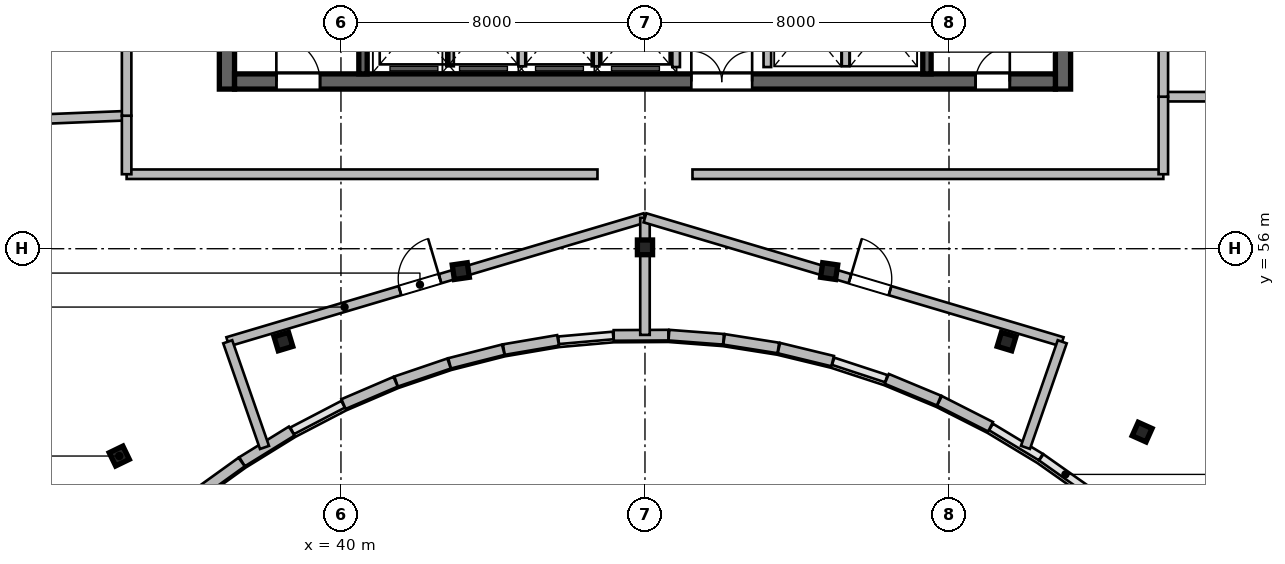
"""IFC4 building model, lengths in metres.
Left out: names, types, materials, properties, quantities, classifications, styles, units other than length and angle.
Written with IfcOpenShell. Run it as: python <this file> out.ifc"""

import sys

from ifc_helpers import new_model, si_unit, direction, frame, frame_2d, origin, origin_2d, place, context, subcontext, project, spatial, rectangle, i_section, extrude, source, transform, mapped, element, fill, save


model = new_model("IFC4")
c1 = context("Model", 3, precision=1e-05, world=origin(), true_north=direction((0.0, 1.0)))
c2 = subcontext(c1, "Body", "Model", "MODEL_VIEW")
j1 = project(units=[si_unit("LENGTHUNIT", "METRE"), si_unit("PLANEANGLEUNIT", "RADIAN")], contexts=[c1])
p1 = place(None, origin())
s1 = spatial("IfcSite", under=j1, at=p1, CompositionType="ELEMENT")
p2 = place(p1, origin())
s2 = spatial("IfcBuilding", under=s1, at=p2, CompositionType="ELEMENT")
p3 = place(p2, frame((0.0, 0.0, 295.2)))
s3 = spatial("IfcBuildingStorey", under=s2, at=p3, CompositionType="ELEMENT", Elevation=295.2)
m1 = source(origin(), c2, "Body", "SweptSolid", [
    extrude(rectangle(XDim=12.0, YDim=0.4, at=frame_2d((6.0, 0.0))), origin(), (0.0, 0.0, 1.0), 3.9),
])
for number, where, z_axis, x_axis in (
    (1, (37.0, 60.2, 0.0), (0.0, 0.0, 1.0), (0.0, 1.0, 0.0)),
    (2, (59.0, 60.2, 0.0), (0.0, 0.0, 1.0), (0.0, 1.0, 0.0)),
):
    element("IfcWall", number, at=place(p3, frame(where, z_axis=z_axis, x_axis=x_axis)), inside=s3, PredefinedType="SHEAR", context=c2, shape_type="MappedRepresentation", body=[
        mapped(m1, transform((0.0, 0.0, 0.0), scale=1.0)),
    ])
m2 = source(origin(), c2, "Body", "SweptSolid", [
    extrude(rectangle(XDim=21.6, YDim=0.4, at=frame_2d((10.8, 0.0))), origin(), (0.0, 0.0, 1.0), 3.9),
])
p4 = place(p3, frame((37.2, 60.4, 0.0), z_axis=(0.0, 0.0, 1.0), x_axis=(1.0, 0.0, 0.0)))
e3 = element("IfcWall", 3, at=p4, inside=s3, PredefinedType="SHEAR", context=c2, shape_type="MappedRepresentation", body=[
    mapped(m2, transform((0.0, 0.0, 0.0), scale=1.0)),
])
p5 = place(p4, frame((1.1, 0.0, 0.0)))
e4 = element("IfcOpeningElement", 4, at=p5, cuts=e3, PredefinedType="OPENING", context=c2, shape_type="SweptSolid", body=[
    extrude(rectangle(XDim=1.15, YDim=2.15, at=frame_2d((0.575, 1.075))), frame((0.0, 0.21, 0.0), z_axis=(0.0, -1.0, 0.0), x_axis=(1.0, 0.0, 0.0)), (0.0, 0.0, 1.0), 0.42),
])
p6 = place(p4, frame((19.5, 0.0, 0.0)))
e5 = element("IfcOpeningElement", 5, at=p6, cuts=e3, PredefinedType="OPENING", context=c2, shape_type="SweptSolid", body=[
    extrude(rectangle(XDim=0.9, YDim=2.1, at=frame_2d((0.45, 1.05))), frame((0.0, 0.21, 0.0), z_axis=(0.0, -1.0, 0.0), x_axis=(1.0, 0.0, 0.0)), (0.0, 0.0, 1.0), 0.42),
])
p7 = place(p4, frame((12.02, 0.0, 0.0)))
e6 = element("IfcOpeningElement", 6, at=p7, cuts=e3, PredefinedType="OPENING", context=c2, shape_type="SweptSolid", body=[
    extrude(rectangle(XDim=1.6, YDim=2.15, at=frame_2d((0.8, 1.075))), frame((0.0, 0.21, 0.0), z_axis=(0.0, -1.0, 0.0), x_axis=(1.0, 0.0, 0.0)), (0.0, 0.0, 1.0), 0.42),
])
m3 = source(origin(), c2, "Body", "SweptSolid", [
    extrude(rectangle(XDim=11.2, YDim=0.22, at=frame_2d((5.6, 0.0))), origin(), (0.0, 0.0, 1.0), 3.9),
])
p8 = place(p3, frame((40.58, 60.6, 0.0), z_axis=(0.0, 0.0, 1.0), x_axis=(0.0, 1.0, 0.0)))
e7 = element("IfcWall", 7, at=p8, inside=s3, PredefinedType="SHEAR", context=c2, shape_type="MappedRepresentation", body=[
    mapped(m3, transform((0.0, 0.0, 0.0), scale=1.0)),
])
p9 = place(p3, frame((55.42, 60.6, 0.0), z_axis=(0.0, 0.0, 1.0), x_axis=(0.0, 1.0, 0.0)))
e8 = element("IfcWall", 8, at=p9, inside=s3, PredefinedType="SHEAR", context=c2, shape_type="MappedRepresentation", body=[
    mapped(m3, transform((0.0, 0.0, 0.0), scale=1.0)),
])
p10 = place(p9, frame((9.645, 0.0, 0.0)))
e9 = element("IfcOpeningElement", 9, at=p10, cuts=e8, PredefinedType="OPENING", context=c2, shape_type="SweptSolid", body=[
    extrude(rectangle(XDim=1.15, YDim=2.15, at=frame_2d((0.575, 1.075))), frame((0.0, 0.12, 0.0), z_axis=(0.0, -1.0, 0.0), x_axis=(1.0, 0.0, 0.0)), (0.0, 0.0, 1.0), 0.24),
])
m4 = source(origin(), c2, "Body", "SweptSolid", [
    extrude(i_section(OverallWidth=0.399, OverallDepth=0.387, WebThickness=0.021, FlangeThickness=0.033, at=origin_2d()), origin(), (0.0, 0.0, 1.0), 3.9),
])
for number, where, z_axis, x_axis in (
    (10, (34.166, 50.545, 0.0), (0.0, 0.0, 1.0), (-0.436, 0.9, 0.0)),
    (11, (38.485, 53.558, 0.0), (0.0, 0.0, 1.0), (-0.289, 0.957, 0.0)),
    (12, (43.154, 55.411, 0.0), (0.0, 0.0, 1.0), (-0.143, 0.99, 0.0)),
    (13, (48.0, 56.036, 0.0), (0.0, 0.0, 1.0), (0.0, 1.0, 0.0)),
    (14, (52.846, 55.411, 0.0), (0.0, 0.0, 1.0), (0.143, 0.99, 0.0)),
    (15, (57.515, 53.558, 0.0), (0.0, 0.0, 1.0), (0.289, 0.957, 0.0)),
    (16, (61.082, 51.175, 0.0), (0.0, 0.0, 1.0), (0.409, 0.912, 0.0)),
):
    element("IfcColumn", number, at=place(p3, frame(where, z_axis=z_axis, x_axis=x_axis)), inside=s3, PredefinedType="COLUMN", context=c2, shape_type="MappedRepresentation", body=[
        mapped(m4, transform((0.0, 0.0, 0.0), scale=1.0)),
    ])
m5 = source(origin(), c2, "Body", "SweptSolid", [
    extrude(rectangle(XDim=1.509, YDim=0.28, at=frame_2d((0.754, 0.0))), origin(), (0.0, 0.0, 1.0), 3.64),
])
p11 = place(p3, frame((57.094, 51.315, 0.0), z_axis=(0.0, 0.0, 1.0), x_axis=(-0.89169189228, 0.452642871635, 0.0)))
e17 = element("IfcWall", 17, at=p11, inside=s3, PredefinedType="SOLIDWALL", context=c2, shape_type="MappedRepresentation", body=[
    mapped(m5, transform((0.0, 0.0, 0.0), scale=1.0)),
])
m6 = source(origin(), c2, "Body", "SweptSolid", [
    extrude(rectangle(XDim=1.488, YDim=0.28, at=frame_2d((0.744, 0.0))), origin(), (0.0, 0.0, 1.0), 3.64),
])
p12 = place(p3, frame((55.736, 52.004, 0.0), z_axis=(0.0, 0.0, 1.0), x_axis=(-0.923261314935, 0.384172545017, 0.0)))
e18 = element("IfcWall", 18, at=p12, inside=s3, PredefinedType="SOLIDWALL", context=c2, shape_type="MappedRepresentation", body=[
    mapped(m6, transform((0.0, 0.0, 0.0), scale=1.0)),
])
m7 = source(origin(), c2, "Body", "SweptSolid", [
    extrude(rectangle(XDim=1.457, YDim=0.28, at=frame_2d((0.728, 0.0))), origin(), (0.0, 0.0, 1.0), 3.64),
])
p13 = place(p3, frame((52.939, 53.042, 0.0), z_axis=(0.0, 0.0, 1.0), x_axis=(-0.97187219902, 0.23550887196, 0.0)))
e19 = element("IfcWall", 19, at=p13, inside=s3, PredefinedType="SOLIDWALL", context=c2, shape_type="MappedRepresentation", body=[
    mapped(m7, transform((0.0, 0.0, 0.0), scale=1.0)),
])
m8 = source(origin(), c2, "Body", "SweptSolid", [
    extrude(rectangle(XDim=1.446, YDim=0.28, at=frame_2d((0.723, 0.0))), origin(), (0.0, 0.0, 1.0), 3.64),
])
p14 = place(p3, frame((51.509, 53.388, 0.0), z_axis=(0.0, 0.0, 1.0), x_axis=(-0.987650460941, 0.156673440642, 0.0)))
e20 = element("IfcWall", 20, at=p14, inside=s3, PredefinedType="SOLIDWALL", context=c2, shape_type="MappedRepresentation", body=[
    mapped(m8, transform((0.0, 0.0, 0.0), scale=1.0)),
])
m9 = source(origin(), c2, "Body", "SweptSolid", [
    extrude(rectangle(XDim=1.44, YDim=0.28, at=frame_2d((0.72, 0.0))), origin(), (0.0, 0.0, 1.0), 3.64),
])
p15 = place(p3, frame((50.066, 53.616, 0.0), z_axis=(0.0, 0.0, 1.0), x_axis=(-0.997124860794, 0.075776064736, 0.0)))
e21 = element("IfcWall", 21, at=p15, inside=s3, PredefinedType="SOLIDWALL", context=c2, shape_type="MappedRepresentation", body=[
    mapped(m9, transform((0.0, 0.0, 0.0), scale=1.0)),
])
m10 = source(origin(), c2, "Body", "SweptSolid", [
    extrude(rectangle(XDim=1.438, YDim=0.28, at=frame_2d((0.719, 0.0))), origin(), (0.0, 0.0, 1.0), 3.64),
])
p16 = place(p3, frame((48.615, 53.726, 0.0), z_axis=(0.0, 0.0, 1.0), x_axis=(-0.999982357135, -0.005940153174, 0.0)))
e22 = element("IfcWall", 22, at=p16, inside=s3, PredefinedType="SOLIDWALL", context=c2, shape_type="MappedRepresentation", body=[
    mapped(m10, transform((0.0, 0.0, 0.0), scale=1.0)),
])
m11 = source(origin(), c2, "Body", "SweptSolid", [
    extrude(rectangle(XDim=1.447, YDim=0.28, at=frame_2d((0.724, 0.0))), origin(), (0.0, 0.0, 1.0), 3.64),
])
p17 = place(p3, frame((45.713, 53.589, 0.0), z_axis=(0.0, 0.0, 1.0), x_axis=(-0.985785525921, -0.168008621461, 0.0)))
e23 = element("IfcWall", 23, at=p17, inside=s3, PredefinedType="SOLIDWALL", context=c2, shape_type="MappedRepresentation", body=[
    mapped(m11, transform((0.0, 0.0, 0.0), scale=1.0)),
])
m12 = source(origin(), c2, "Body", "SweptSolid", [
    extrude(rectangle(XDim=1.458, YDim=0.28, at=frame_2d((0.729, 0.0))), origin(), (0.0, 0.0, 1.0), 3.64),
])
p18 = place(p3, frame((44.271, 53.343, 0.0), z_axis=(0.0, 0.0, 1.0), x_axis=(-0.969109544438, -0.246630677083, 0.0)))
e24 = element("IfcWall", 24, at=p18, inside=s3, PredefinedType="SOLIDWALL", context=c2, shape_type="MappedRepresentation", body=[
    mapped(m12, transform((0.0, 0.0, 0.0), scale=1.0)),
])
m13 = source(origin(), c2, "Body", "SweptSolid", [
    extrude(rectangle(XDim=1.473, YDim=0.28, at=frame_2d((0.736, 0.0))), origin(), (0.0, 0.0, 1.0), 3.64),
])
p19 = place(p3, frame((42.845, 52.979, 0.0), z_axis=(0.0, 0.0, 1.0), x_axis=(-0.946641296917, -0.322289086026, 0.0)))
e25 = element("IfcWall", 25, at=p19, inside=s3, PredefinedType="SOLIDWALL", context=c2, shape_type="MappedRepresentation", body=[
    mapped(m13, transform((0.0, 0.0, 0.0), scale=1.0)),
])
m14 = source(origin(), c2, "Body", "SweptSolid", [
    extrude(rectangle(XDim=1.49, YDim=0.28, at=frame_2d((0.745, 0.0))), origin(), (0.0, 0.0, 1.0), 3.64),
])
p20 = place(p3, frame((41.438, 52.5, 0.0), z_axis=(0.0, 0.0, 1.0), x_axis=(-0.919009427656, -0.394235553799, 0.0)))
e26 = element("IfcWall", 26, at=p20, inside=s3, PredefinedType="SOLIDWALL", context=c2, shape_type="MappedRepresentation", body=[
    mapped(m14, transform((0.0, 0.0, 0.0), scale=1.0)),
])
m15 = source(origin(), c2, "Body", "SweptSolid", [
    extrude(rectangle(XDim=1.535, YDim=0.28, at=frame_2d((0.768, 0.0))), origin(), (0.0, 0.0, 1.0), 3.64),
])
p21 = place(p3, frame((38.704, 51.201, 0.0), z_axis=(0.0, 0.0, 1.0), x_axis=(-0.850756173541, -0.525560589449, 0.0)))
e27 = element("IfcWall", 27, at=p21, inside=s3, PredefinedType="SOLIDWALL", context=c2, shape_type="MappedRepresentation", body=[
    mapped(m15, transform((0.0, 0.0, 0.0), scale=1.0)),
])
m16 = source(origin(), c2, "Body", "SweptSolid", [
    extrude(rectangle(XDim=1.561, YDim=0.28, at=frame_2d((0.781, 0.0))), origin(), (0.0, 0.0, 1.0), 3.64),
])
p22 = place(p3, frame((37.387, 50.387, 0.0), z_axis=(0.0, 0.0, 1.0), x_axis=(-0.81154027425, -0.584296485758, 0.0)))
e28 = element("IfcWall", 28, at=p22, inside=s3, PredefinedType="SOLIDWALL", context=c2, shape_type="MappedRepresentation", body=[
    mapped(m16, transform((0.0, 0.0, 0.0), scale=1.0)),
])
m17 = source(origin(), c2, "Body", "SweptSolid", [
    extrude(rectangle(XDim=2.24, YDim=0.2, at=frame_2d((1.12, 0.0))), origin(), (0.0, 0.0, 1.0), 3.64),
])
for number, where, z_axis, x_axis in (
    (29, (48.82, 60.78, 0.0), (0.0, 0.0, 1.0), (0.0, 1.0, 0.0)),
    (30, (51.22, 60.78, 0.0), (0.0, 0.0, 1.0), (0.0, 1.0, 0.0)),
):
    element("IfcWall", number, at=place(p3, frame(where, z_axis=z_axis, x_axis=x_axis)), inside=s3, PredefinedType="SOLIDWALL", context=c2, shape_type="MappedRepresentation", body=[
        mapped(m17, transform((0.0, 0.0, 0.0), scale=1.0)),
    ])
m18 = source(origin(), c2, "Body", "SweptSolid", [
    extrude(rectangle(XDim=2.2, YDim=0.2, at=frame_2d((1.1, 0.0))), origin(), (0.0, 0.0, 1.0), 3.64),
])
for number, where, z_axis, x_axis in (
    (31, (42.87, 60.8, 0.0), (0.0, 0.0, 1.0), (0.0, 1.0, 0.0)),
    (32, (44.77, 60.8, 0.0), (0.0, 0.0, 1.0), (0.0, 1.0, 0.0)),
    (33, (46.7, 60.8, 0.0), (0.0, 0.0, 1.0), (0.0, 1.0, 0.0)),
    (34, (53.28, 60.8, 0.0), (0.0, 0.0, 1.0), (0.0, 1.0, 0.0)),
):
    element("IfcWall", number, at=place(p3, frame(where, z_axis=z_axis, x_axis=x_axis)), inside=s3, PredefinedType="SOLIDWALL", context=c2, shape_type="MappedRepresentation", body=[
        mapped(m18, transform((0.0, 0.0, 0.0), scale=1.0)),
    ])
m19 = source(origin(), c2, "Body", "SweptSolid", [
    extrude(rectangle(XDim=11.454, YDim=0.25, at=frame_2d((5.727, 0.0))), origin(), (0.0, 0.0, 1.0), 3.314),
])
p23 = place(p3, frame((37.021, 53.552, 0.0), z_axis=(0.0, 0.0, 1.0), x_axis=(0.958594874645, 0.284773359541, 0.0)))
e35 = element("IfcWall", 35, at=p23, inside=s3, PredefinedType="PARTITIONING", context=c2, shape_type="MappedRepresentation", body=[
    mapped(m19, transform((0.0, 0.0, 0.0), scale=1.0)),
])
p24 = place(p23, frame((4.727, 0.0, 0.0)))
e36 = element("IfcOpeningElement", 36, at=p24, cuts=e35, PredefinedType="OPENING", context=c2, shape_type="SweptSolid", body=[
    extrude(rectangle(XDim=1.1, YDim=2.15, at=frame_2d((0.55, 1.075))), frame((0.0, 0.135, 0.0), z_axis=(0.0, -1.0, 0.0), x_axis=(1.0, 0.0, 0.0)), (0.0, 0.0, 1.0), 0.27),
])
m20 = source(origin(), c2, "Body", "SweptSolid", [
    extrude(rectangle(XDim=2.944, YDim=0.25, at=frame_2d((1.472, 0.0))), origin(), (0.0, 0.0, 1.0), 3.64),
])
p25 = place(p3, frame((37.988, 50.771, 0.0), z_axis=(0.0, 0.0, 1.0), x_axis=(-0.328565655286, 0.944481132774, 0.0)))
e37 = element("IfcWall", 37, at=p25, inside=s3, PredefinedType="PARTITIONING", context=c2, shape_type="MappedRepresentation", body=[
    mapped(m20, transform((0.0, 0.0, 0.0), scale=1.0)),
])
m21 = source(origin(), c2, "Body", "SweptSolid", [
    extrude(rectangle(XDim=3.081, YDim=0.25, at=frame_2d((1.54, 0.0))), origin(), (0.0, 0.0, 1.0), 3.314),
])
p26 = place(p3, frame((48.0, 53.733, 0.0), z_axis=(0.0, 0.0, 1.0), x_axis=(0.0, 1.0, 0.0)))
e38 = element("IfcWall", 38, at=p26, inside=s3, PredefinedType="PARTITIONING", context=c2, shape_type="MappedRepresentation", body=[
    mapped(m21, transform((0.0, 0.0, 0.0), scale=1.0)),
])
p27 = place(p3, frame((48.0, 56.813, 0.0), z_axis=(0.0, 0.0, 1.0), x_axis=(0.958594874645, -0.284773359541, 0.0)))
e39 = element("IfcWall", 39, at=p27, inside=s3, PredefinedType="PARTITIONING", context=c2, shape_type="MappedRepresentation", body=[
    mapped(m19, transform((0.0, 0.0, 0.0), scale=1.0)),
])
p28 = place(p27, frame((5.627, 0.0, 0.0)))
e40 = element("IfcOpeningElement", 40, at=p28, cuts=e39, PredefinedType="OPENING", context=c2, shape_type="SweptSolid", body=[
    extrude(rectangle(XDim=1.1, YDim=2.15, at=frame_2d((0.55, 1.075))), frame((0.0, 0.135, 0.0), z_axis=(0.0, -1.0, 0.0), x_axis=(1.0, 0.0, 0.0)), (0.0, 0.0, 1.0), 0.27),
])
m22 = source(origin(), c2, "Body", "SweptSolid", [
    extrude(rectangle(XDim=2.942, YDim=0.25, at=frame_2d((1.471, 0.0))), origin(), (0.0, 0.0, 1.0), 3.64),
])
p29 = place(p3, frame((58.013, 50.773, 0.0), z_axis=(0.0, 0.0, 1.0), x_axis=(0.328623620494, 0.944460965871, 0.0)))
e41 = element("IfcWall", 41, at=p29, inside=s3, PredefinedType="PARTITIONING", context=c2, shape_type="MappedRepresentation", body=[
    mapped(m22, transform((0.0, 0.0, 0.0), scale=1.0)),
])
m23 = source(origin(), c2, "Body", "SweptSolid", [
    extrude(rectangle(XDim=12.39, YDim=0.25, at=frame_2d((6.195, 0.0))), origin(), (0.0, 0.0, 1.0), 3.64),
])
for number, where, z_axis, x_axis in (
    (42, (34.36, 57.96, 0.0), (0.0, 0.0, 1.0), (1.0, 0.0, 0.0)),
    (43, (49.25, 57.96, 0.0), (0.0, 0.0, 1.0), (1.0, 0.0, 0.0)),
):
    element("IfcWall", number, at=place(p3, frame(where, z_axis=z_axis, x_axis=x_axis)), inside=s3, PredefinedType="PARTITIONING", context=c2, shape_type="MappedRepresentation", body=[
        mapped(m23, transform((0.0, 0.0, 0.0), scale=1.0)),
    ])
m24 = source(origin(), c2, "Body", "SweptSolid", [
    extrude(rectangle(XDim=13.499, YDim=0.25, at=frame_2d((6.75, 0.0))), origin(), (0.0, 0.0, 1.0), 3.64),
])
p30 = place(p3, frame((20.872, 58.951, 0.0), z_axis=(0.0, 0.0, 1.0), x_axis=(0.999172424054, 0.04067513995, 0.0)))
e44 = element("IfcWall", 44, at=p30, inside=s3, PredefinedType="PARTITIONING", context=c2, shape_type="MappedRepresentation", body=[
    mapped(m24, transform((0.0, 0.0, 0.0), scale=1.0)),
])
m25 = source(origin(), c2, "Body", "SweptSolid", [
    extrude(rectangle(XDim=1.54, YDim=0.25, at=frame_2d((0.77, 0.0))), origin(), (0.0, 0.0, 1.0), 3.64),
])
p31 = place(p3, frame((34.36, 57.96, 0.0), z_axis=(0.0, 0.0, 1.0), x_axis=(0.0, 1.0, 0.0)))
e45 = element("IfcWall", 45, at=p31, inside=s3, PredefinedType="PARTITIONING", context=c2, shape_type="MappedRepresentation", body=[
    mapped(m25, transform((0.0, 0.0, 0.0), scale=1.0)),
])
m26 = source(origin(), c2, "Body", "SweptSolid", [
    extrude(rectangle(XDim=6.0, YDim=0.25, at=frame_2d((3.0, 0.0))), origin(), (0.0, 0.0, 1.0), 3.64),
])
p32 = place(p3, frame((34.36, 59.5, 0.0), z_axis=(0.0, 0.0, 1.0), x_axis=(0.0, 1.0, 0.0)))
e46 = element("IfcWall", 46, at=p32, inside=s3, PredefinedType="PARTITIONING", context=c2, shape_type="MappedRepresentation", body=[
    mapped(m26, transform((0.0, 0.0, 0.0), scale=1.0)),
])
p33 = place(p32, frame((2.45, 0.0, 0.0)))
e47 = element("IfcOpeningElement", 47, at=p33, cuts=e46, PredefinedType="OPENING", context=c2, shape_type="SweptSolid", body=[
    extrude(rectangle(XDim=1.1, YDim=2.15, at=frame_2d((0.55, 1.075))), frame((0.0, 0.135, 0.0), z_axis=(0.0, -1.0, 0.0), x_axis=(1.0, 0.0, 0.0)), (0.0, 0.0, 1.0), 0.27),
])
m27 = source(origin(), c2, "Body", "SweptSolid", [
    extrude(rectangle(XDim=11.633, YDim=0.25, at=frame_2d((5.816, 0.0))), origin(), (0.0, 0.0, 1.0), 3.64),
])
p34 = place(p3, frame((61.64, 60.0, 0.0), z_axis=(0.0, 0.0, 1.0), x_axis=(1.0, 0.0, 0.0)))
e48 = element("IfcWall", 48, at=p34, inside=s3, PredefinedType="PARTITIONING", context=c2, shape_type="MappedRepresentation", body=[
    mapped(m27, transform((0.0, 0.0, 0.0), scale=1.0)),
])
m28 = source(origin(), c2, "Body", "SweptSolid", [
    extrude(rectangle(XDim=2.04, YDim=0.25, at=frame_2d((1.02, 0.0))), origin(), (0.0, 0.0, 1.0), 3.64),
])
p35 = place(p3, frame((61.64, 57.96, 0.0), z_axis=(0.0, 0.0, 1.0), x_axis=(0.0, 1.0, 0.0)))
e49 = element("IfcWall", 49, at=p35, inside=s3, PredefinedType="PARTITIONING", context=c2, shape_type="MappedRepresentation", body=[
    mapped(m28, transform((0.0, 0.0, 0.0), scale=1.0)),
])
m29 = source(origin(), c2, "Body", "SweptSolid", [
    extrude(rectangle(XDim=5.5, YDim=0.25, at=frame_2d((2.75, 0.0))), origin(), (0.0, 0.0, 1.0), 3.64),
])
p36 = place(p3, frame((61.64, 60.0, 0.0), z_axis=(0.0, 0.0, 1.0), x_axis=(0.0, 1.0, 0.0)))
e50 = element("IfcWall", 50, at=p36, inside=s3, PredefinedType="PARTITIONING", context=c2, shape_type="MappedRepresentation", body=[
    mapped(m29, transform((0.0, 0.0, 0.0), scale=1.0)),
])
p37 = place(p36, frame((1.615, 0.0, 0.0)))
e51 = element("IfcOpeningElement", 51, at=p37, cuts=e50, PredefinedType="OPENING", context=c2, shape_type="SweptSolid", body=[
    extrude(rectangle(XDim=0.95, YDim=2.1, at=frame_2d((0.475, 1.05))), frame((0.0, 0.135, 0.0), z_axis=(0.0, -1.0, 0.0), x_axis=(1.0, 0.0, 0.0)), (0.0, 0.0, 1.0), 0.27),
])
m30 = source(origin(), c2, "Body", "SweptSolid", [
    extrude(rectangle(XDim=1.15, YDim=2.15, at=frame_2d((0.575, 1.075))), frame((0.0, 0.025, 0.0), z_axis=(0.0, -1.0, 0.0), x_axis=(1.0, 0.0, 0.0)), (0.0, 0.0, 1.0), 0.05),
])
p38 = place(p5, origin())
e52 = element("IfcDoor", 52, at=p38, inside=s3, OperationType="SINGLE_SWING_LEFT", PredefinedType="DOOR", context=c2, shape_type="MappedRepresentation", body=[
    mapped(m30, transform((0.0, 0.0, 0.0), scale=1.0)),
])
fill(e4, e52)
m31 = source(origin(), c2, "Body", "SweptSolid", [
    extrude(rectangle(XDim=0.9, YDim=2.1, at=frame_2d((0.45, 1.05))), frame((0.0, 0.025, 0.0), z_axis=(0.0, -1.0, 0.0), x_axis=(1.0, 0.0, 0.0)), (0.0, 0.0, 1.0), 0.05),
])
p39 = place(p6, origin())
e53 = element("IfcDoor", 53, at=p39, inside=s3, OperationType="SINGLE_SWING_RIGHT", PredefinedType="DOOR", context=c2, shape_type="MappedRepresentation", body=[
    mapped(m31, transform((0.0, 0.0, 0.0), scale=1.0)),
])
fill(e5, e53)
m32 = source(origin(), c2, "Body", "SweptSolid", [
    extrude(rectangle(XDim=1.6, YDim=2.15, at=frame_2d((0.8, 1.075))), frame((0.0, 0.025, 0.0), z_axis=(0.0, -1.0, 0.0), x_axis=(1.0, 0.0, 0.0)), (0.0, 0.0, 1.0), 0.05),
])
p40 = place(p7, origin())
e54 = element("IfcDoor", 54, at=p40, inside=s3, OperationType="DOUBLE_DOOR_SINGLE_SWING", PredefinedType="DOOR", context=c2, shape_type="MappedRepresentation", body=[
    mapped(m32, transform((0.0, 0.0, 0.0), scale=1.0)),
])
fill(e6, e54)
m33 = source(origin(), c2, "Body", "SweptSolid", [
    extrude(rectangle(XDim=1.1, YDim=2.15, at=frame_2d((0.55, 1.075))), frame((0.0, 0.025, 0.0), z_axis=(0.0, -1.0, 0.0), x_axis=(1.0, 0.0, 0.0)), (0.0, 0.0, 1.0), 0.05),
])
p41 = place(p24, origin())
e55 = element("IfcDoor", 55, at=p41, inside=s3, OperationType="SINGLE_SWING_RIGHT", PredefinedType="DOOR", context=c2, shape_type="MappedRepresentation", body=[
    mapped(m33, transform((0.0, 0.0, 0.0), scale=1.0)),
])
fill(e36, e55)
p42 = place(p28, origin())
e56 = element("IfcDoor", 56, at=p42, inside=s3, OperationType="SINGLE_SWING_LEFT", PredefinedType="DOOR", context=c2, shape_type="MappedRepresentation", body=[
    mapped(m33, transform((0.0, 0.0, 0.0), scale=1.0)),
])
fill(e40, e56)
save(model, sys.argv[1])
